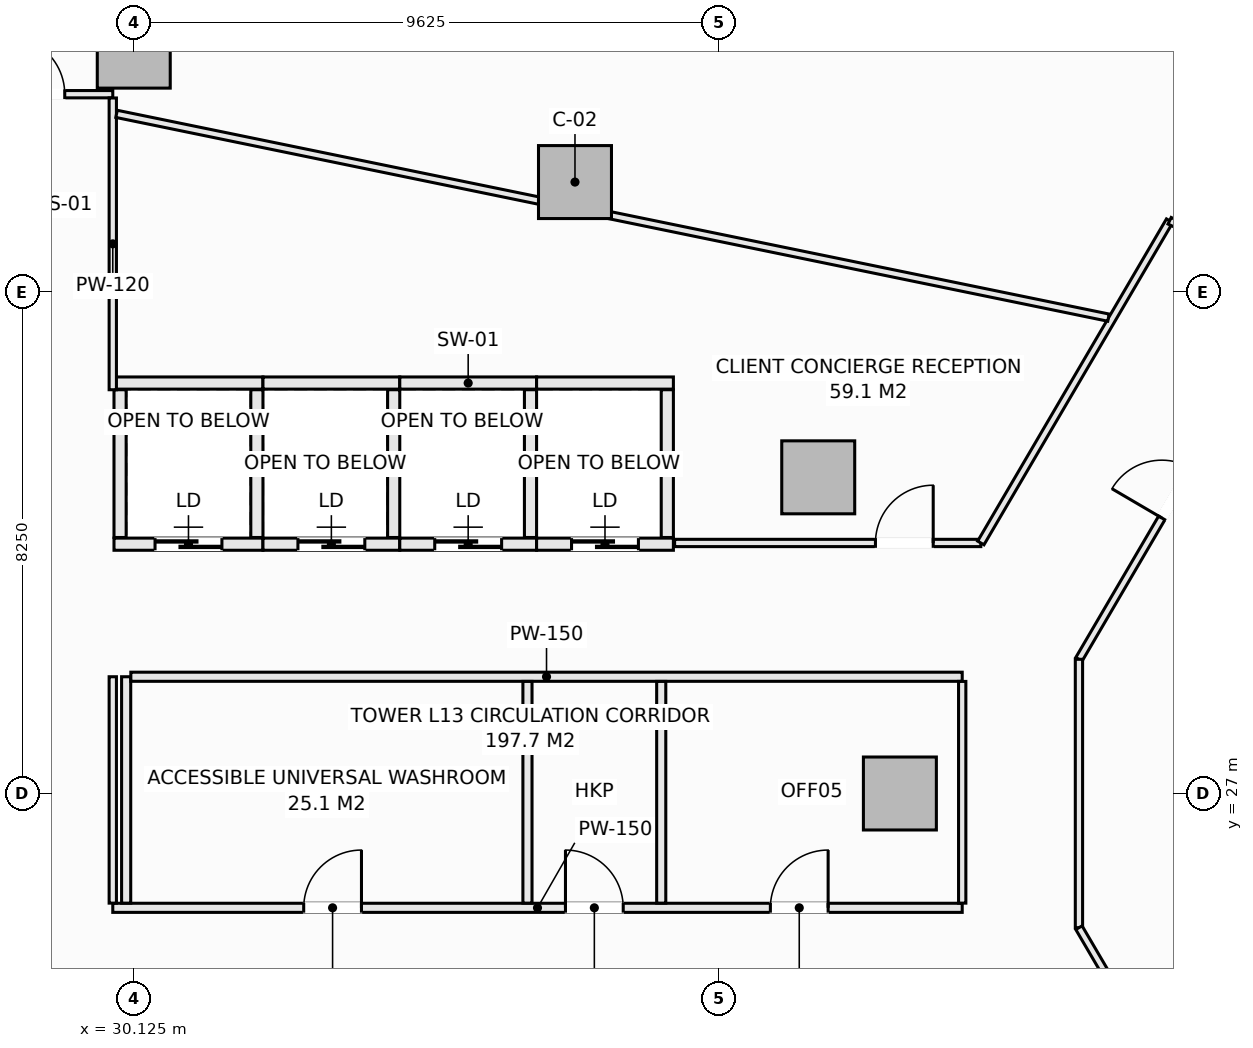
"""IFC4 building model, lengths in metres.
Left out: names, types, materials, properties, quantities, classifications, styles, units other than length and angle.
Written with IfcOpenShell. Run it as: python <this file> out.ifc"""

import sys

from ifc_helpers import new_model, si_unit, direction, frame, frame_2d, origin, origin_2d, place, context, subcontext, project, spatial, rectangle, extrude, element, fill, save


model = new_model("IFC4")
c1 = context("Model", 3, precision=1e-05, world=origin(), true_north=direction((0.0, 1.0)))
c2 = subcontext(c1, "Body", "Model", "MODEL_VIEW")
j1 = project(units=[si_unit("LENGTHUNIT", "METRE"), si_unit("PLANEANGLEUNIT", "RADIAN")], contexts=[c1])
p1 = place(None, origin())
s1 = spatial("IfcSite", under=j1, at=p1, CompositionType="ELEMENT")
p2 = place(p1, origin())
s2 = spatial("IfcBuilding", under=s1, at=p2, CompositionType="ELEMENT")
p3 = place(p2, frame((0.0, 0.0, 57.3)))
s3 = spatial("IfcBuildingStorey", under=s2, at=p3, CompositionType="ELEMENT", Elevation=57.3)
for number, where, z_axis, x_axis in (
    (1, (42.725, 27.0, -0.28), (0.0, 0.0, 1.0), (1.0, 0.0, 0.0)),
    (2, (41.382, 32.199, -0.28), (0.0, 0.0, 1.0), (1.0, 0.0, 0.0)),
    (3, (37.382, 37.055, -0.28), (0.0, 0.0, 1.0), (1.0, 0.0, 0.0)),
    (4, (30.125, 39.2, -0.28), (0.0, 0.0, 1.0), (1.0, 0.0, 0.0)),
):
    element("IfcColumn", number, at=place(p3, frame(where, z_axis=z_axis, x_axis=x_axis)), inside=s3, PredefinedType="COLUMN", context=c2, shape_type="SweptSolid", body=[
        extrude(rectangle(XDim=1.2, YDim=1.2, at=origin_2d()), origin(), (0.0, 0.0, 1.0), 3.85),
    ])
p4 = place(p3, frame((47.224, 40.36, 0.0), z_axis=(0.0, 0.0, 1.0), x_axis=(0.901354747727, -0.433081538224, 0.0)))
e5 = element("IfcWall", 5, at=p4, inside=s3, PredefinedType="SOLIDWALL", context=c2, shape_type="SweptSolid", body=[
    extrude(rectangle(XDim=6.431, YDim=0.3, at=frame_2d((3.215, 0.0))), origin(), (0.0, 0.0, 1.0), 3.093),
])
p5 = place(p4, frame((2.015, 0.0, 0.85)))
e6 = element("IfcOpeningElement", 6, at=p5, cuts=e5, PredefinedType="OPENING", context=c2, shape_type="SweptSolid", body=[
    extrude(rectangle(XDim=2.4, YDim=1.9, at=frame_2d((1.2, 0.95))), frame((0.0, 0.16, 0.0), z_axis=(0.0, -1.0, 0.0), x_axis=(1.0, 0.0, 0.0)), (0.0, 0.0, 1.0), 0.32),
])
p6 = place(p3, frame((29.8, 33.75, 0.0), z_axis=(0.0, 0.0, 1.0), x_axis=(1.0, 0.0, 0.0)))
e7 = element("IfcWall", 7, at=p6, inside=s3, PredefinedType="SOLIDWALL", context=c2, shape_type="SweptSolid", body=[
    extrude(rectangle(XDim=2.45, YDim=0.2, at=frame_2d((1.225, 0.0))), origin(), (0.0, 0.0, 1.0), 3.57),
])
p7 = place(p3, frame((29.8, 31.1, 0.0), z_axis=(0.0, 0.0, 1.0), x_axis=(1.0, 0.0, 0.0)))
e8 = element("IfcWall", 8, at=p7, inside=s3, PredefinedType="SOLIDWALL", context=c2, shape_type="SweptSolid", body=[
    extrude(rectangle(XDim=2.45, YDim=0.2, at=frame_2d((1.225, 0.0))), origin(), (0.0, 0.0, 1.0), 3.57),
])
p8 = place(p7, frame((0.675, 0.0, 0.0)))
e9 = element("IfcOpeningElement", 9, at=p8, cuts=e8, PredefinedType="OPENING", context=c2, shape_type="SweptSolid", body=[
    extrude(rectangle(XDim=1.1, YDim=2.2, at=frame_2d((0.55, 1.1))), frame((0.0, 0.11, 0.0), z_axis=(0.0, -1.0, 0.0), x_axis=(1.0, 0.0, 0.0)), (0.0, 0.0, 1.0), 0.22),
])
for number, where, z_axis, x_axis in (
    (10, (29.9, 31.21, 0.0), (0.0, 0.0, 1.0), (0.0, 1.0, 0.0)),
    (11, (32.15, 31.21, 0.0), (0.0, 0.0, 1.0), (0.0, 1.0, 0.0)),
):
    element("IfcWall", number, at=place(p3, frame(where, z_axis=z_axis, x_axis=x_axis)), inside=s3, PredefinedType="SOLIDWALL", context=c2, shape_type="SweptSolid", body=[
        extrude(rectangle(XDim=2.43, YDim=0.2, at=frame_2d((1.215, 0.0))), origin(), (0.0, 0.0, 1.0), 3.57),
    ])
p9 = place(p3, frame((32.25, 33.75, 0.0), z_axis=(0.0, 0.0, 1.0), x_axis=(1.0, 0.0, 0.0)))
e12 = element("IfcWall", 12, at=p9, inside=s3, PredefinedType="SOLIDWALL", context=c2, shape_type="SweptSolid", body=[
    extrude(rectangle(XDim=2.25, YDim=0.2, at=frame_2d((1.125, 0.0))), origin(), (0.0, 0.0, 1.0), 3.57),
])
p10 = place(p3, frame((32.25, 31.1, 0.0), z_axis=(0.0, 0.0, 1.0), x_axis=(1.0, 0.0, 0.0)))
e13 = element("IfcWall", 13, at=p10, inside=s3, PredefinedType="SOLIDWALL", context=c2, shape_type="SweptSolid", body=[
    extrude(rectangle(XDim=2.25, YDim=0.2, at=frame_2d((1.125, 0.0))), origin(), (0.0, 0.0, 1.0), 3.57),
])
p11 = place(p10, frame((0.575, 0.0, 0.0)))
e14 = element("IfcOpeningElement", 14, at=p11, cuts=e13, PredefinedType="OPENING", context=c2, shape_type="SweptSolid", body=[
    extrude(rectangle(XDim=1.1, YDim=2.2, at=frame_2d((0.55, 1.1))), frame((0.0, 0.11, 0.0), z_axis=(0.0, -1.0, 0.0), x_axis=(1.0, 0.0, 0.0)), (0.0, 0.0, 1.0), 0.22),
])
p12 = place(p3, frame((34.4, 31.21, 0.0), z_axis=(0.0, 0.0, 1.0), x_axis=(0.0, 1.0, 0.0)))
e15 = element("IfcWall", 15, at=p12, inside=s3, PredefinedType="SOLIDWALL", context=c2, shape_type="SweptSolid", body=[
    extrude(rectangle(XDim=2.43, YDim=0.2, at=frame_2d((1.215, 0.0))), origin(), (0.0, 0.0, 1.0), 3.57),
])
p13 = place(p3, frame((34.5, 33.75, 0.0), z_axis=(0.0, 0.0, 1.0), x_axis=(1.0, 0.0, 0.0)))
e16 = element("IfcWall", 16, at=p13, inside=s3, PredefinedType="SOLIDWALL", context=c2, shape_type="SweptSolid", body=[
    extrude(rectangle(XDim=2.25, YDim=0.2, at=frame_2d((1.125, 0.0))), origin(), (0.0, 0.0, 1.0), 3.57),
])
p14 = place(p3, frame((34.5, 31.1, 0.0), z_axis=(0.0, 0.0, 1.0), x_axis=(1.0, 0.0, 0.0)))
e17 = element("IfcWall", 17, at=p14, inside=s3, PredefinedType="SOLIDWALL", context=c2, shape_type="SweptSolid", body=[
    extrude(rectangle(XDim=2.25, YDim=0.2, at=frame_2d((1.125, 0.0))), origin(), (0.0, 0.0, 1.0), 3.57),
])
p15 = place(p14, frame((0.575, 0.0, 0.0)))
e18 = element("IfcOpeningElement", 18, at=p15, cuts=e17, PredefinedType="OPENING", context=c2, shape_type="SweptSolid", body=[
    extrude(rectangle(XDim=1.1, YDim=2.2, at=frame_2d((0.55, 1.1))), frame((0.0, 0.11, 0.0), z_axis=(0.0, -1.0, 0.0), x_axis=(1.0, 0.0, 0.0)), (0.0, 0.0, 1.0), 0.22),
])
p16 = place(p3, frame((36.65, 31.21, 0.0), z_axis=(0.0, 0.0, 1.0), x_axis=(0.0, 1.0, 0.0)))
e19 = element("IfcWall", 19, at=p16, inside=s3, PredefinedType="SOLIDWALL", context=c2, shape_type="SweptSolid", body=[
    extrude(rectangle(XDim=2.43, YDim=0.2, at=frame_2d((1.215, 0.0))), origin(), (0.0, 0.0, 1.0), 3.57),
])
p17 = place(p3, frame((36.75, 33.75, 0.0), z_axis=(0.0, 0.0, 1.0), x_axis=(1.0, 0.0, 0.0)))
e20 = element("IfcWall", 20, at=p17, inside=s3, PredefinedType="SOLIDWALL", context=c2, shape_type="SweptSolid", body=[
    extrude(rectangle(XDim=2.25, YDim=0.2, at=frame_2d((1.125, 0.0))), origin(), (0.0, 0.0, 1.0), 3.57),
])
p18 = place(p3, frame((36.75, 31.1, 0.0), z_axis=(0.0, 0.0, 1.0), x_axis=(1.0, 0.0, 0.0)))
e21 = element("IfcWall", 21, at=p18, inside=s3, PredefinedType="SOLIDWALL", context=c2, shape_type="SweptSolid", body=[
    extrude(rectangle(XDim=2.25, YDim=0.2, at=frame_2d((1.125, 0.0))), origin(), (0.0, 0.0, 1.0), 3.57),
])
p19 = place(p18, frame((0.575, 0.0, 0.0)))
e22 = element("IfcOpeningElement", 22, at=p19, cuts=e21, PredefinedType="OPENING", context=c2, shape_type="SweptSolid", body=[
    extrude(rectangle(XDim=1.1, YDim=2.2, at=frame_2d((0.55, 1.1))), frame((0.0, 0.11, 0.0), z_axis=(0.0, -1.0, 0.0), x_axis=(1.0, 0.0, 0.0)), (0.0, 0.0, 1.0), 0.22),
])
p20 = place(p3, frame((38.9, 31.21, 0.0), z_axis=(0.0, 0.0, 1.0), x_axis=(0.0, 1.0, 0.0)))
e23 = element("IfcWall", 23, at=p20, inside=s3, PredefinedType="SOLIDWALL", context=c2, shape_type="SweptSolid", body=[
    extrude(rectangle(XDim=2.43, YDim=0.2, at=frame_2d((1.215, 0.0))), origin(), (0.0, 0.0, 1.0), 3.57),
])
p21 = place(p3, frame((29.78, 25.12, 0.0), z_axis=(0.0, 0.0, 1.0), x_axis=(1.0, 0.0, 0.0)))
e24 = element("IfcWall", 24, at=p21, inside=s3, PredefinedType="PARTITIONING", context=c2, shape_type="SweptSolid", body=[
    extrude(rectangle(XDim=13.97, YDim=0.15, at=frame_2d((6.985, 0.0))), origin(), (0.0, 0.0, 1.0), 3.57),
])
p22 = place(p21, frame((3.14, 0.0, 0.0)))
e25 = element("IfcOpeningElement", 25, at=p22, cuts=e24, PredefinedType="OPENING", context=c2, shape_type="SweptSolid", body=[
    extrude(rectangle(XDim=0.95, YDim=2.1, at=frame_2d((0.475, 1.05))), frame((0.0, 0.085, 0.0), z_axis=(0.0, -1.0, 0.0), x_axis=(1.0, 0.0, 0.0)), (0.0, 0.0, 1.0), 0.17),
])
p23 = place(p21, frame((7.445, 0.0, 0.0)))
e26 = element("IfcOpeningElement", 26, at=p23, cuts=e24, PredefinedType="OPENING", context=c2, shape_type="SweptSolid", body=[
    extrude(rectangle(XDim=0.95, YDim=2.1, at=frame_2d((0.475, 1.05))), frame((0.0, 0.085, 0.0), z_axis=(0.0, -1.0, 0.0), x_axis=(1.0, 0.0, 0.0)), (0.0, 0.0, 1.0), 0.17),
])
p24 = place(p21, frame((10.815, 0.0, 0.0)))
e27 = element("IfcOpeningElement", 27, at=p24, cuts=e24, PredefinedType="OPENING", context=c2, shape_type="SweptSolid", body=[
    extrude(rectangle(XDim=0.95, YDim=2.1, at=frame_2d((0.475, 1.05))), frame((0.0, 0.085, 0.0), z_axis=(0.0, -1.0, 0.0), x_axis=(1.0, 0.0, 0.0)), (0.0, 0.0, 1.0), 0.17),
])
p25 = place(p3, frame((30.0, 25.197, 0.0), z_axis=(0.0, 0.0, 1.0), x_axis=(0.0, 1.0, 0.0)))
e28 = element("IfcWall", 28, at=p25, inside=s3, PredefinedType="PARTITIONING", context=c2, shape_type="SweptSolid", body=[
    extrude(rectangle(XDim=3.723, YDim=0.15, at=frame_2d((1.861, 0.0))), origin(), (0.0, 0.0, 1.0), 3.57),
])
p26 = place(p3, frame((30.077, 28.92, 0.0), z_axis=(0.0, 0.0, 1.0), x_axis=(1.0, 0.0, 0.0)))
e29 = element("IfcWall", 29, at=p26, inside=s3, PredefinedType="PARTITIONING", context=c2, shape_type="SweptSolid", body=[
    extrude(rectangle(XDim=13.673, YDim=0.15, at=frame_2d((6.836, 0.0))), origin(), (0.0, 0.0, 1.0), 3.57),
])
for number, where, z_axis, x_axis in (
    (30, (36.6, 25.197, 0.0), (0.0, 0.0, 1.0), (0.0, 1.0, 0.0)),
    (31, (38.8, 25.197, 0.0), (0.0, 0.0, 1.0), (0.0, 1.0, 0.0)),
):
    element("IfcWall", number, at=place(p3, frame(where, z_axis=z_axis, x_axis=x_axis)), inside=s3, PredefinedType="PARTITIONING", context=c2, shape_type="SweptSolid", body=[
        extrude(rectangle(XDim=3.646, YDim=0.15, at=frame_2d((1.823, 0.0))), origin(), (0.0, 0.0, 1.0), 3.57),
    ])
p27 = place(p3, frame((27.25, 38.5, 0.0), z_axis=(0.0, 0.0, 1.0), x_axis=(1.0, 0.0, 0.0)))
e32 = element("IfcWall", 32, at=p27, inside=s3, PredefinedType="PARTITIONING", context=c2, shape_type="SweptSolid", body=[
    extrude(rectangle(XDim=2.53, YDim=0.12, at=frame_2d((1.265, 0.0))), origin(), (0.0, 0.0, 1.0), 3.57),
])
p28 = place(p27, frame((0.79, 0.0, 0.0)))
e33 = element("IfcOpeningElement", 33, at=p28, cuts=e32, PredefinedType="OPENING", context=c2, shape_type="SweptSolid", body=[
    extrude(rectangle(XDim=0.95, YDim=2.1, at=frame_2d((0.475, 1.05))), frame((0.0, 0.07, 0.0), z_axis=(0.0, -1.0, 0.0), x_axis=(1.0, 0.0, 0.0)), (0.0, 0.0, 1.0), 0.14),
])
p29 = place(p3, frame((29.78, 25.197, 0.0), z_axis=(0.0, 0.0, 1.0), x_axis=(0.0, 1.0, 0.0)))
e34 = element("IfcWall", 34, at=p29, inside=s3, PredefinedType="PARTITIONING", context=c2, shape_type="SweptSolid", body=[
    extrude(rectangle(XDim=3.723, YDim=0.12, at=frame_2d((1.861, 0.0))), origin(), (0.0, 0.0, 1.0), 3.57),
])
p30 = place(p3, frame((29.78, 33.64, 0.0), z_axis=(0.0, 0.0, 1.0), x_axis=(0.0, 1.0, 0.0)))
e35 = element("IfcWall", 35, at=p30, inside=s3, PredefinedType="PARTITIONING", context=c2, shape_type="SweptSolid", body=[
    extrude(rectangle(XDim=4.798, YDim=0.12, at=frame_2d((2.399, 0.0))), origin(), (0.0, 0.0, 1.0), 3.57),
])
p31 = place(p3, frame((39.02, 31.12, 0.0), z_axis=(0.0, 0.0, 1.0), x_axis=(1.0, 0.0, 0.0)))
e36 = element("IfcWall", 36, at=p31, inside=s3, PredefinedType="PARTITIONING", context=c2, shape_type="SweptSolid", body=[
    extrude(rectangle(XDim=5.036, YDim=0.12, at=frame_2d((2.518, 0.0))), origin(), (0.0, 0.0, 1.0), 3.57),
])
p32 = place(p31, frame((3.303, 0.0, 0.0)))
e37 = element("IfcOpeningElement", 37, at=p32, cuts=e36, PredefinedType="OPENING", context=c2, shape_type="SweptSolid", body=[
    extrude(rectangle(XDim=0.95, YDim=2.1, at=frame_2d((0.475, 1.05))), frame((0.0, 0.07, 0.0), z_axis=(0.0, -1.0, 0.0), x_axis=(1.0, 0.0, 0.0)), (0.0, 0.0, 1.0), 0.14),
])
p33 = place(p3, frame((44.056, 31.12, 0.0), z_axis=(0.0, 0.0, 1.0), x_axis=(0.505570543943, 0.86278527172, 0.0)))
e38 = element("IfcWall", 38, at=p33, inside=s3, PredefinedType="PARTITIONING", context=c2, shape_type="SweptSolid", body=[
    extrude(rectangle(XDim=6.142, YDim=0.12, at=frame_2d((3.071, 0.0))), origin(), (0.0, 0.0, 1.0), 3.205),
])
p34 = place(p3, frame((47.161, 36.419, 0.0), z_axis=(0.0, 0.0, 1.0), x_axis=(0.901268684569, -0.433260612351, 0.0)))
e39 = element("IfcWall", 39, at=p34, inside=s3, PredefinedType="PARTITIONING", context=c2, shape_type="SweptSolid", body=[
    extrude(rectangle(XDim=2.368, YDim=0.12, at=frame_2d((1.184, 0.0))), origin(), (0.0, 0.0, 1.0), 3.57),
])
p35 = place(p3, frame((45.67, 29.207, 0.0), z_axis=(0.0, 0.0, 1.0), x_axis=(0.505582857323, 0.86277805627, 0.0)))
e40 = element("IfcWall", 40, at=p35, inside=s3, PredefinedType="PARTITIONING", context=c2, shape_type="SweptSolid", body=[
    extrude(rectangle(XDim=7.108, YDim=0.12, at=frame_2d((3.554, 0.0))), origin(), (0.0, 0.0, 1.0), 3.57),
])
p36 = place(p35, frame((2.695, 0.0, 0.0)))
e41 = element("IfcOpeningElement", 41, at=p36, cuts=e40, PredefinedType="OPENING", context=c2, shape_type="SweptSolid", body=[
    extrude(rectangle(XDim=0.95, YDim=2.1, at=frame_2d((0.475, 1.05))), frame((0.0, 0.07, 0.0), z_axis=(0.0, -1.0, 0.0), x_axis=(1.0, 0.0, 0.0)), (0.0, 0.0, 1.0), 0.14),
])
p37 = place(p3, frame((45.67, 24.793, 0.0), z_axis=(0.0, 0.0, 1.0), x_axis=(0.0, 1.0, 0.0)))
e42 = element("IfcWall", 42, at=p37, inside=s3, PredefinedType="PARTITIONING", context=c2, shape_type="SweptSolid", body=[
    extrude(rectangle(XDim=4.414, YDim=0.12, at=frame_2d((2.207, 0.0))), origin(), (0.0, 0.0, 1.0), 3.57),
])
p38 = place(p3, frame((45.67, 24.793, 0.0), z_axis=(0.0, 0.0, 1.0), x_axis=(0.505584917928, -0.862776848764, 0.0)))
e43 = element("IfcWall", 43, at=p38, inside=s3, PredefinedType="PARTITIONING", context=c2, shape_type="SweptSolid", body=[
    extrude(rectangle(XDim=7.17, YDim=0.12, at=frame_2d((3.585, 0.0))), origin(), (0.0, 0.0, 1.0), 3.57),
])
p39 = place(p38, frame((5.016, 0.0, 0.0)))
e44 = element("IfcOpeningElement", 44, at=p39, cuts=e43, PredefinedType="OPENING", context=c2, shape_type="SweptSolid", body=[
    extrude(rectangle(XDim=0.95, YDim=2.1, at=frame_2d((0.475, 1.05))), frame((0.0, 0.07, 0.0), z_axis=(0.0, -1.0, 0.0), x_axis=(1.0, 0.0, 0.0)), (0.0, 0.0, 1.0), 0.14),
])
p40 = place(p3, frame((43.75, 25.197, 0.0), z_axis=(0.0, 0.0, 1.0), x_axis=(0.0, 1.0, 0.0)))
e45 = element("IfcWall", 45, at=p40, inside=s3, PredefinedType="PARTITIONING", context=c2, shape_type="SweptSolid", body=[
    extrude(rectangle(XDim=3.646, YDim=0.12, at=frame_2d((1.823, 0.0))), origin(), (0.0, 0.0, 1.0), 3.57),
])
p41 = place(p3, frame((29.842, 38.177, 0.0), z_axis=(0.0, 0.0, 1.0), x_axis=(0.979543984113, -0.201230174647, 0.0)))
e46 = element("IfcWall", 46, at=p41, inside=s3, PredefinedType="PARTITIONING", context=c2, shape_type="SweptSolid", body=[
    extrude(rectangle(XDim=16.654, YDim=0.12, at=frame_2d((8.327, 0.0))), origin(), (0.0, 0.0, 1.0), 2.934),
])
p42 = place(p8, origin())
e47 = element("IfcDoor", 47, at=p42, inside=s3, OperationType="SLIDING_TO_LEFT", PredefinedType="DOOR", context=c2, shape_type="SweptSolid", body=[
    extrude(rectangle(XDim=1.1, YDim=2.2, at=frame_2d((0.55, 1.1))), frame((0.0, 0.025, 0.0), z_axis=(0.0, -1.0, 0.0), x_axis=(1.0, 0.0, 0.0)), (0.0, 0.0, 1.0), 0.05),
])
fill(e9, e47)
p43 = place(p11, origin())
e48 = element("IfcDoor", 48, at=p43, inside=s3, OperationType="SLIDING_TO_LEFT", PredefinedType="DOOR", context=c2, shape_type="SweptSolid", body=[
    extrude(rectangle(XDim=1.1, YDim=2.2, at=frame_2d((0.55, 1.1))), frame((0.0, 0.025, 0.0), z_axis=(0.0, -1.0, 0.0), x_axis=(1.0, 0.0, 0.0)), (0.0, 0.0, 1.0), 0.05),
])
fill(e14, e48)
p44 = place(p15, origin())
e49 = element("IfcDoor", 49, at=p44, inside=s3, OperationType="SLIDING_TO_LEFT", PredefinedType="DOOR", context=c2, shape_type="SweptSolid", body=[
    extrude(rectangle(XDim=1.1, YDim=2.2, at=frame_2d((0.55, 1.1))), frame((0.0, 0.025, 0.0), z_axis=(0.0, -1.0, 0.0), x_axis=(1.0, 0.0, 0.0)), (0.0, 0.0, 1.0), 0.05),
])
fill(e18, e49)
p45 = place(p19, origin())
e50 = element("IfcDoor", 50, at=p45, inside=s3, OperationType="SLIDING_TO_LEFT", PredefinedType="DOOR", context=c2, shape_type="SweptSolid", body=[
    extrude(rectangle(XDim=1.1, YDim=2.2, at=frame_2d((0.55, 1.1))), frame((0.0, 0.025, 0.0), z_axis=(0.0, -1.0, 0.0), x_axis=(1.0, 0.0, 0.0)), (0.0, 0.0, 1.0), 0.05),
])
fill(e22, e50)
p46 = place(p22, origin())
e51 = element("IfcDoor", 51, at=p46, inside=s3, OperationType="SINGLE_SWING_RIGHT", PredefinedType="DOOR", context=c2, shape_type="SweptSolid", body=[
    extrude(rectangle(XDim=0.95, YDim=2.1, at=frame_2d((0.475, 1.05))), frame((0.0, 0.025, 0.0), z_axis=(0.0, -1.0, 0.0), x_axis=(1.0, 0.0, 0.0)), (0.0, 0.0, 1.0), 0.05),
])
fill(e25, e51)
p47 = place(p23, origin())
e52 = element("IfcDoor", 52, at=p47, inside=s3, OperationType="SINGLE_SWING_LEFT", PredefinedType="DOOR", context=c2, shape_type="SweptSolid", body=[
    extrude(rectangle(XDim=0.95, YDim=2.1, at=frame_2d((0.475, 1.05))), frame((0.0, 0.025, 0.0), z_axis=(0.0, -1.0, 0.0), x_axis=(1.0, 0.0, 0.0)), (0.0, 0.0, 1.0), 0.05),
])
fill(e26, e52)
p48 = place(p24, origin())
e53 = element("IfcDoor", 53, at=p48, inside=s3, OperationType="SINGLE_SWING_RIGHT", PredefinedType="DOOR", context=c2, shape_type="SweptSolid", body=[
    extrude(rectangle(XDim=0.95, YDim=2.1, at=frame_2d((0.475, 1.05))), frame((0.0, 0.025, 0.0), z_axis=(0.0, -1.0, 0.0), x_axis=(1.0, 0.0, 0.0)), (0.0, 0.0, 1.0), 0.05),
])
fill(e27, e53)
p49 = place(p36, origin())
e54 = element("IfcDoor", 54, at=p49, inside=s3, OperationType="SINGLE_SWING_LEFT", PredefinedType="DOOR", context=c2, shape_type="SweptSolid", body=[
    extrude(rectangle(XDim=0.95, YDim=2.1, at=frame_2d((0.475, 1.05))), frame((0.0, 0.025, 0.0), z_axis=(0.0, -1.0, 0.0), x_axis=(1.0, 0.0, 0.0)), (0.0, 0.0, 1.0), 0.05),
])
fill(e41, e54)
p50 = place(p32, origin())
e55 = element("IfcDoor", 55, at=p50, inside=s3, OperationType="SINGLE_SWING_RIGHT", PredefinedType="DOOR", context=c2, shape_type="SweptSolid", body=[
    extrude(rectangle(XDim=0.95, YDim=2.1, at=frame_2d((0.475, 1.05))), frame((0.0, 0.025, 0.0), z_axis=(0.0, -1.0, 0.0), x_axis=(1.0, 0.0, 0.0)), (0.0, 0.0, 1.0), 0.05),
])
fill(e37, e55)
p51 = place(p28, origin())
e56 = element("IfcDoor", 56, at=p51, inside=s3, OperationType="SINGLE_SWING_LEFT", PredefinedType="DOOR", context=c2, shape_type="SweptSolid", body=[
    extrude(rectangle(XDim=0.95, YDim=2.1, at=frame_2d((0.475, 1.05))), frame((0.0, 0.025, 0.0), z_axis=(0.0, -1.0, 0.0), x_axis=(1.0, 0.0, 0.0)), (0.0, 0.0, 1.0), 0.05),
])
fill(e33, e56)
save(model, sys.argv[1])
